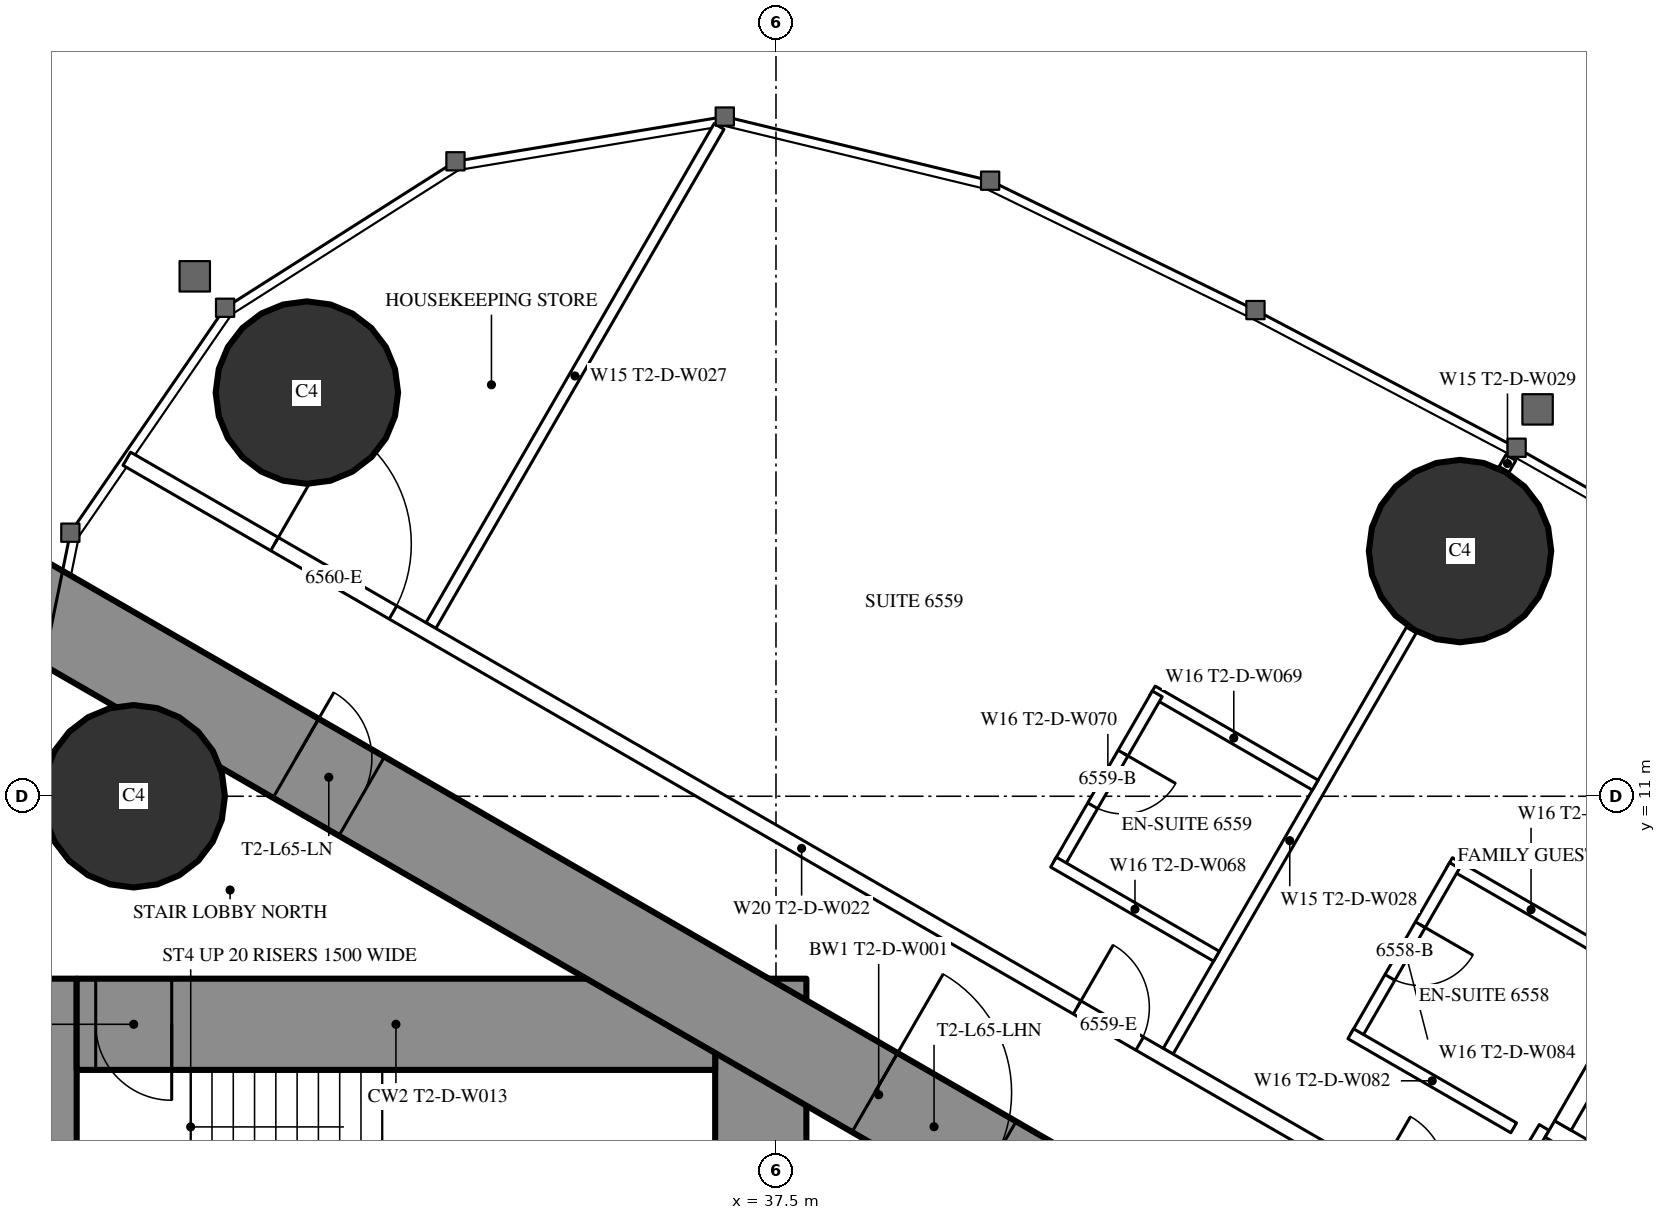
"""IFC4 building model, lengths in metres.
Left out: names, types, materials, properties, quantities, classifications, styles, units other than length and angle.
Written with IfcOpenShell. Run it as: python <this file> out.ifc"""

import sys

from ifc_helpers import new_model, si_unit, direction, frame, frame_2d, origin, origin_2d, place, context, subcontext, project, spatial, rectangle, circle, extrude, element, fill, save


model = new_model("IFC4")
c1 = context("Model", 3, precision=1e-05, world=origin(), true_north=direction((0.0, 1.0)))
c2 = subcontext(c1, "Body", "Model", "MODEL_VIEW")
j1 = project(units=[si_unit("LENGTHUNIT", "METRE"), si_unit("PLANEANGLEUNIT", "RADIAN")], contexts=[c1])
p1 = place(None, origin())
s1 = spatial("IfcSite", under=j1, at=p1, CompositionType="ELEMENT")
p2 = place(p1, origin())
s2 = spatial("IfcBuilding", under=s1, at=p2, CompositionType="ELEMENT")
p3 = place(p2, frame((0.0, 0.0, 244.1)))
s3 = spatial("IfcBuildingStorey", under=s2, at=p3, CompositionType="ELEMENT", Elevation=244.1)
for number, where, z_axis, x_axis in (
    (1, (31.328, 16.311, 0.0), (0.0, 0.0, 1.0), (1.0, 0.0, 0.0)),
    (2, (29.05, 11.0, 0.0), (0.0, 0.0, 1.0), (1.0, 0.0, 0.0)),
    (3, (46.499, 14.226, 0.0), (0.0, 0.0, 1.0), (1.0, 0.0, 0.0)),
):
    element("IfcColumn", number, at=place(p3, frame(where, z_axis=z_axis, x_axis=x_axis)), inside=s3, PredefinedType="COLUMN", context=c2, shape_type="SweptSolid", body=[
        extrude(circle(Radius=1.2, at=origin_2d()), origin(), (0.0, 0.0, 1.0), 3.6),
    ])
p4 = place(p3, frame((27.9, -8.6, 0.0), z_axis=(0.0, 0.0, 1.0), x_axis=(0.0, 1.0, 0.0)))
e4 = element("IfcWall", 4, at=p4, inside=s3, PredefinedType="SHEAR", context=c2, shape_type="SweptSolid", body=[
    extrude(rectangle(XDim=17.2, YDim=0.8, at=frame_2d((8.6, 0.0))), origin(), (0.0, 0.0, 1.0), 3.6),
])
p5 = place(p4, frame((9.35, 0.0, 0.0)))
e5 = element("IfcOpeningElement", 5, at=p5, cuts=e4, PredefinedType="OPENING", context=c2, shape_type="SweptSolid", body=[
    extrude(rectangle(XDim=0.9, YDim=2.2, at=frame_2d((0.45, 1.1))), frame((0.0, 0.41, 0.0), z_axis=(0.0, -1.0, 0.0), x_axis=(1.0, 0.0, 0.0)), (0.0, 0.0, 1.0), 0.82),
])
p6 = place(p3, frame((37.3, -8.6, 0.0), z_axis=(0.0, 0.0, 1.0), x_axis=(0.0, 1.0, 0.0)))
e6 = element("IfcWall", 6, at=p6, inside=s3, PredefinedType="SHEAR", context=c2, shape_type="SweptSolid", body=[
    extrude(rectangle(XDim=17.2, YDim=1.2, at=frame_2d((8.6, 0.0))), origin(), (0.0, 0.0, 1.0), 3.6),
])
p7 = place(p6, frame((7.7, 0.0, 0.0)))
e7 = element("IfcOpeningElement", 7, at=p7, cuts=e6, PredefinedType="OPENING", context=c2, shape_type="SweptSolid", body=[
    extrude(rectangle(XDim=1.8, YDim=2.2, at=frame_2d((0.9, 1.1))), frame((0.0, 0.61, 0.0), z_axis=(0.0, -1.0, 0.0), x_axis=(1.0, 0.0, 0.0)), (0.0, 0.0, 1.0), 1.22),
])
p8 = place(p3, frame((28.3, 8.0, 0.0), z_axis=(0.0, 0.0, 1.0), x_axis=(1.0, 0.0, 0.0)))
e8 = element("IfcWall", 8, at=p8, inside=s3, PredefinedType="SHEAR", context=c2, shape_type="SweptSolid", body=[
    extrude(rectangle(XDim=8.4, YDim=1.2, at=frame_2d((4.2, 0.0))), origin(), (0.0, 0.0, 1.0), 3.6),
])
p9 = place(p8, frame((0.25, 0.0, 0.0)))
e9 = element("IfcOpeningElement", 9, at=p9, cuts=e8, PredefinedType="OPENING", context=c2, shape_type="SweptSolid", body=[
    extrude(rectangle(XDim=1.0, YDim=2.2, at=frame_2d((0.5, 1.1))), frame((0.0, 0.61, 0.0), z_axis=(0.0, -1.0, 0.0), x_axis=(1.0, 0.0, 0.0)), (0.0, 0.0, 1.0), 1.22),
])
p10 = place(p3, frame((27.2, 13.8, 0.0), z_axis=(0.0, 0.0, 1.0), x_axis=(0.866024515034, -0.500001539357, 0.0)))
e10 = element("IfcWall", 10, at=p10, inside=s3, PredefinedType="SHEAR", context=c2, shape_type="SweptSolid", body=[
    extrude(rectangle(XDim=26.907, YDim=1.2, at=frame_2d((13.454, 0.0))), origin(), (0.0, 0.0, 1.0), 3.6),
])
p11 = place(p10, frame((4.6, 0.0, 0.0)))
e11 = element("IfcOpeningElement", 11, at=p11, cuts=e10, PredefinedType="OPENING", context=c2, shape_type="SweptSolid", body=[
    extrude(rectangle(XDim=1.0, YDim=2.2, at=frame_2d((0.5, 1.1))), frame((0.0, 0.61, 0.0), z_axis=(0.0, -1.0, 0.0), x_axis=(1.0, 0.0, 0.0)), (0.0, 0.0, 1.0), 1.22),
])
p12 = place(p10, frame((13.395, 0.0, 0.0)))
e12 = element("IfcOpeningElement", 12, at=p12, cuts=e10, PredefinedType="OPENING", context=c2, shape_type="SweptSolid", body=[
    extrude(rectangle(XDim=1.8, YDim=2.2, at=frame_2d((0.9, 1.1))), frame((0.0, 0.61, 0.0), z_axis=(0.0, -1.0, 0.0), x_axis=(1.0, 0.0, 0.0)), (0.0, 0.0, 1.0), 1.22),
])
p13 = place(p3, frame((32.96, 13.246, 0.0), z_axis=(0.0, 0.0, 1.0), x_axis=(0.500000236886, 0.866025267018, 0.0)))
e13 = element("IfcWall", 13, at=p13, inside=s3, PredefinedType="PARTITIONING", context=c2, shape_type="SweptSolid", body=[
    extrude(rectangle(XDim=7.583, YDim=0.15, at=frame_2d((3.791, 0.0))), origin(), (0.0, 0.0, 1.0), 3.35),
])
p14 = place(p3, frame((42.66, 7.646, 0.0), z_axis=(0.0, 0.0, 1.0), x_axis=(0.499996592859, 0.866027370889, 0.0)))
e14 = element("IfcWall", 14, at=p14, inside=s3, PredefinedType="PARTITIONING", context=c2, shape_type="SweptSolid", body=[
    extrude(rectangle(XDim=6.398, YDim=0.15, at=frame_2d((3.199, 0.0))), origin(), (0.0, 0.0, 1.0), 2.45),
])
p15 = place(p3, frame((47.079, 15.3, 0.0), z_axis=(0.0, 0.0, 1.0), x_axis=(0.499212083968, 0.866479829667, 0.0)))
e15 = element("IfcWall", 15, at=p15, inside=s3, PredefinedType="PARTITIONING", context=c2, shape_type="SweptSolid", body=[
    extrude(rectangle(XDim=0.179, YDim=0.15, at=frame_2d((0.09, 0.0))), origin(), (0.0, 0.0, 1.0), 2.45),
])
p16 = place(p3, frame((28.959, 15.44, 0.0), z_axis=(0.0, 0.0, 1.0), x_axis=(0.866028936079, -0.499993881836, 0.0)))
e16 = element("IfcWall", 16, at=p16, inside=s3, PredefinedType="PARTITIONING", context=c2, shape_type="SweptSolid", body=[
    extrude(rectangle(XDim=20.503, YDim=0.2, at=frame_2d((10.251, 0.0))), origin(), (0.0, 0.0, 1.0), 3.35),
])
p17 = place(p16, frame((18.953, 0.0, 0.0)))
e17 = element("IfcOpeningElement", 17, at=p17, cuts=e16, PredefinedType="OPENING", context=c2, shape_type="SweptSolid", body=[
    extrude(rectangle(XDim=0.95, YDim=2.2, at=frame_2d((0.475, 1.1))), frame((0.0, 0.11, 0.0), z_axis=(0.0, -1.0, 0.0), x_axis=(1.0, 0.0, 0.0)), (0.0, 0.0, 1.0), 0.22),
])
p18 = place(p16, frame((14.437, 0.0, 0.0)))
e18 = element("IfcOpeningElement", 18, at=p18, cuts=e16, PredefinedType="OPENING", context=c2, shape_type="SweptSolid", body=[
    extrude(rectangle(XDim=0.95, YDim=2.2, at=frame_2d((0.475, 1.1))), frame((0.0, 0.11, 0.0), z_axis=(0.0, -1.0, 0.0), x_axis=(1.0, 0.0, 0.0)), (0.0, 0.0, 1.0), 0.22),
])
p19 = place(p16, frame((2.244, 0.0, 0.0)))
e19 = element("IfcOpeningElement", 19, at=p19, cuts=e16, PredefinedType="OPENING", context=c2, shape_type="SweptSolid", body=[
    extrude(rectangle(XDim=1.8, YDim=2.04, at=frame_2d((0.9, 1.02))), frame((0.0, 0.11, 0.0), z_axis=(0.0, -1.0, 0.0), x_axis=(1.0, 0.0, 0.0)), (0.0, 0.0, 1.0), 0.22),
])
p20 = place(p3, frame((47.606, 6.642, 0.0), z_axis=(0.0, 0.0, 1.0), x_axis=(-0.51353662755, -0.858067673418, 0.0)))
e20 = element("IfcWall", 20, at=p20, inside=s3, PredefinedType="PARTITIONING", context=c2, shape_type="SweptSolid", body=[
    extrude(rectangle(XDim=1.91, YDim=0.15, at=frame_2d((0.955, 0.0))), origin(), (0.0, 0.0, 1.0), 3.35),
])
p21 = place(p3, frame((46.362, 10.127, 0.0), z_axis=(0.0, 0.0, 1.0), x_axis=(0.866006523861, -0.500032699561, 0.0)))
e21 = element("IfcWall", 21, at=p21, inside=s3, PredefinedType="PARTITIONING", context=c2, shape_type="SweptSolid", body=[
    extrude(rectangle(XDim=2.475, YDim=0.15, at=frame_2d((1.237, 0.0))), origin(), (0.0, 0.0, 1.0), 3.35),
])
p22 = place(p3, frame((45.127, 7.838, 0.0), z_axis=(0.0, 0.0, 1.0), x_axis=(0.500006934395, 0.866021400173, 0.0)))
e22 = element("IfcWall", 22, at=p22, inside=s3, PredefinedType="PARTITIONING", context=c2, shape_type="SweptSolid", body=[
    extrude(rectangle(XDim=2.6, YDim=0.15, at=frame_2d((1.3, 0.0))), origin(), (0.0, 0.0, 1.0), 3.35),
])
p23 = place(p22, frame((0.9, 0.0, 0.0)))
e23 = element("IfcOpeningElement", 23, at=p23, cuts=e22, PredefinedType="OPENING", context=c2, shape_type="SweptSolid", body=[
    extrude(rectangle(XDim=0.8, YDim=2.2, at=frame_2d((0.4, 1.1))), frame((0.0, 0.085, 0.0), z_axis=(0.0, -1.0, 0.0), x_axis=(1.0, 0.0, 0.0)), (0.0, 0.0, 1.0), 0.17),
])
p24 = place(p3, frame((45.062, 7.875, 0.0), z_axis=(0.0, 0.0, 1.0), x_axis=(0.866031185235, -0.4999899861, 0.0)))
e24 = element("IfcWall", 24, at=p24, inside=s3, PredefinedType="PARTITIONING", context=c2, shape_type="SweptSolid", body=[
    extrude(rectangle(XDim=2.475, YDim=0.15, at=frame_2d((1.238, 0.0))), origin(), (0.0, 0.0, 1.0), 2.5),
])
p25 = place(p3, frame((42.451, 12.385, 0.0), z_axis=(0.0, 0.0, 1.0), x_axis=(0.866031185235, -0.4999899861, 0.0)))
e25 = element("IfcWall", 25, at=p25, inside=s3, PredefinedType="PARTITIONING", context=c2, shape_type="SweptSolid", body=[
    extrude(rectangle(XDim=2.475, YDim=0.15, at=frame_2d((1.238, 0.0))), origin(), (0.0, 0.0, 1.0), 3.35),
])
p26 = place(p3, frame((41.216, 10.095, 0.0), z_axis=(0.0, 0.0, 1.0), x_axis=(0.499936506574, 0.866062058628, 0.0)))
e26 = element("IfcWall", 26, at=p26, inside=s3, PredefinedType="PARTITIONING", context=c2, shape_type="SweptSolid", body=[
    extrude(rectangle(XDim=2.6, YDim=0.15, at=frame_2d((1.3, 0.0))), origin(), (0.0, 0.0, 1.0), 3.35),
])
p27 = place(p26, frame((0.9, 0.0, 0.0)))
e27 = element("IfcOpeningElement", 27, at=p27, cuts=e26, PredefinedType="OPENING", context=c2, shape_type="SweptSolid", body=[
    extrude(rectangle(XDim=0.8, YDim=2.2, at=frame_2d((0.4, 1.1))), frame((0.0, 0.085, 0.0), z_axis=(0.0, -1.0, 0.0), x_axis=(1.0, 0.0, 0.0)), (0.0, 0.0, 1.0), 0.17),
])
p28 = place(p3, frame((41.151, 10.133, 0.0), z_axis=(0.0, 0.0, 1.0), x_axis=(0.866006523861, -0.500032699561, 0.0)))
e28 = element("IfcWall", 28, at=p28, inside=s3, PredefinedType="PARTITIONING", context=c2, shape_type="SweptSolid", body=[
    extrude(rectangle(XDim=2.475, YDim=0.15, at=frame_2d((1.237, 0.0))), origin(), (0.0, 0.0, 1.0), 2.5),
])
p29 = place(p3, frame((47.681, 6.622, 0.0), z_axis=(0.0, 0.0, 1.0), x_axis=(0.86603344179, -0.499986077507, 0.0)))
e29 = element("IfcWall", 29, at=p29, inside=s3, PredefinedType="PARTITIONING", context=c2, shape_type="SweptSolid", body=[
    extrude(rectangle(XDim=6.6, YDim=0.25, at=frame_2d((3.3, 0.0))), origin(), (0.0, 0.0, 1.0), 3.35),
])
p30 = place(p29, frame((0.75, 0.0, 0.0)))
e30 = element("IfcOpeningElement", 30, at=p30, cuts=e29, PredefinedType="OPENING", context=c2, shape_type="SweptSolid", body=[
    extrude(rectangle(XDim=1.1, YDim=2.2, at=frame_2d((0.55, 1.1))), frame((0.0, 0.135, 0.0), z_axis=(0.0, -1.0, 0.0), x_axis=(1.0, 0.0, 0.0)), (0.0, 0.0, 1.0), 0.27),
])
p31 = place(p29, frame((2.75, 0.0, 0.0)))
e31 = element("IfcOpeningElement", 31, at=p31, cuts=e29, PredefinedType="OPENING", context=c2, shape_type="SweptSolid", body=[
    extrude(rectangle(XDim=1.1, YDim=2.2, at=frame_2d((0.55, 1.1))), frame((0.0, 0.135, 0.0), z_axis=(0.0, -1.0, 0.0), x_axis=(1.0, 0.0, 0.0)), (0.0, 0.0, 1.0), 0.27),
])
p32 = place(p29, frame((4.75, 0.0, 0.0)))
e32 = element("IfcOpeningElement", 32, at=p32, cuts=e29, PredefinedType="OPENING", context=c2, shape_type="SweptSolid", body=[
    extrude(rectangle(XDim=1.1, YDim=2.2, at=frame_2d((0.55, 1.1))), frame((0.0, 0.135, 0.0), z_axis=(0.0, -1.0, 0.0), x_axis=(1.0, 0.0, 0.0)), (0.0, 0.0, 1.0), 0.27),
])
p33 = place(p3, frame((47.852, 6.668, 0.0), z_axis=(0.0, 0.0, 1.0), x_axis=(0.499929347863, 0.866066190972, 0.0)))
e33 = element("IfcWall", 33, at=p33, inside=s3, PredefinedType="PARTITIONING", context=c2, shape_type="SweptSolid", body=[
    extrude(rectangle(XDim=3.201, YDim=0.25, at=frame_2d((1.6, 0.0))), origin(), (0.0, 0.0, 1.0), 3.35),
])
p34 = place(p23, origin())
e34 = element("IfcDoor", 34, at=p34, inside=s3, OperationType="SINGLE_SWING_RIGHT", PredefinedType="DOOR", context=c2, shape_type="SweptSolid", body=[
    extrude(rectangle(XDim=0.8, YDim=2.2, at=frame_2d((0.4, 1.1))), frame((0.0, 0.025, 0.0), z_axis=(0.0, -1.0, 0.0), x_axis=(1.0, 0.0, 0.0)), (0.0, 0.0, 1.0), 0.05),
])
fill(e23, e34)
p35 = place(p27, origin())
e35 = element("IfcDoor", 35, at=p35, inside=s3, OperationType="SINGLE_SWING_RIGHT", PredefinedType="DOOR", context=c2, shape_type="SweptSolid", body=[
    extrude(rectangle(XDim=0.8, YDim=2.2, at=frame_2d((0.4, 1.1))), frame((0.0, 0.025, 0.0), z_axis=(0.0, -1.0, 0.0), x_axis=(1.0, 0.0, 0.0)), (0.0, 0.0, 1.0), 0.05),
])
fill(e27, e35)
p36 = place(p18, origin())
e36 = element("IfcDoor", 36, at=p36, inside=s3, OperationType="SINGLE_SWING_LEFT", PredefinedType="DOOR", context=c2, shape_type="SweptSolid", body=[
    extrude(rectangle(XDim=0.95, YDim=2.2, at=frame_2d((0.475, 1.1))), frame((0.0, 0.025, 0.0), z_axis=(0.0, -1.0, 0.0), x_axis=(1.0, 0.0, 0.0)), (0.0, 0.0, 1.0), 0.05),
])
fill(e18, e36)
p37 = place(p19, origin())
e37 = element("IfcDoor", 37, at=p37, inside=s3, OperationType="DOUBLE_DOOR_SINGLE_SWING", PredefinedType="DOOR", context=c2, shape_type="SweptSolid", body=[
    extrude(rectangle(XDim=1.8, YDim=2.04, at=frame_2d((0.9, 1.02))), frame((0.0, 0.025, 0.0), z_axis=(0.0, -1.0, 0.0), x_axis=(1.0, 0.0, 0.0)), (0.0, 0.0, 1.0), 0.05),
])
fill(e19, e37)
p38 = place(p11, origin())
e38 = element("IfcDoor", 38, at=p38, inside=s3, OperationType="SINGLE_SWING_LEFT", PredefinedType="DOOR", context=c2, shape_type="SweptSolid", body=[
    extrude(rectangle(XDim=1.0, YDim=2.2, at=frame_2d((0.5, 1.1))), frame((0.0, 0.025, 0.0), z_axis=(0.0, -1.0, 0.0), x_axis=(1.0, 0.0, 0.0)), (0.0, 0.0, 1.0), 0.05),
])
fill(e11, e38)
p39 = place(p12, origin())
e39 = element("IfcDoor", 39, at=p39, inside=s3, OperationType="DOUBLE_DOOR_SINGLE_SWING", PredefinedType="DOOR", context=c2, shape_type="SweptSolid", body=[
    extrude(rectangle(XDim=1.8, YDim=2.2, at=frame_2d((0.9, 1.1))), frame((0.0, 0.025, 0.0), z_axis=(0.0, -1.0, 0.0), x_axis=(1.0, 0.0, 0.0)), (0.0, 0.0, 1.0), 0.05),
])
fill(e12, e39)
p40 = place(p9, origin())
e40 = element("IfcDoor", 40, at=p40, inside=s3, OperationType="SINGLE_SWING_RIGHT", PredefinedType="DOOR", context=c2, shape_type="SweptSolid", body=[
    extrude(rectangle(XDim=1.0, YDim=2.2, at=frame_2d((0.5, 1.1))), frame((0.0, 0.025, 0.0), z_axis=(0.0, -1.0, 0.0), x_axis=(1.0, 0.0, 0.0)), (0.0, 0.0, 1.0), 0.05),
])
fill(e9, e40)
save(model, sys.argv[1])
